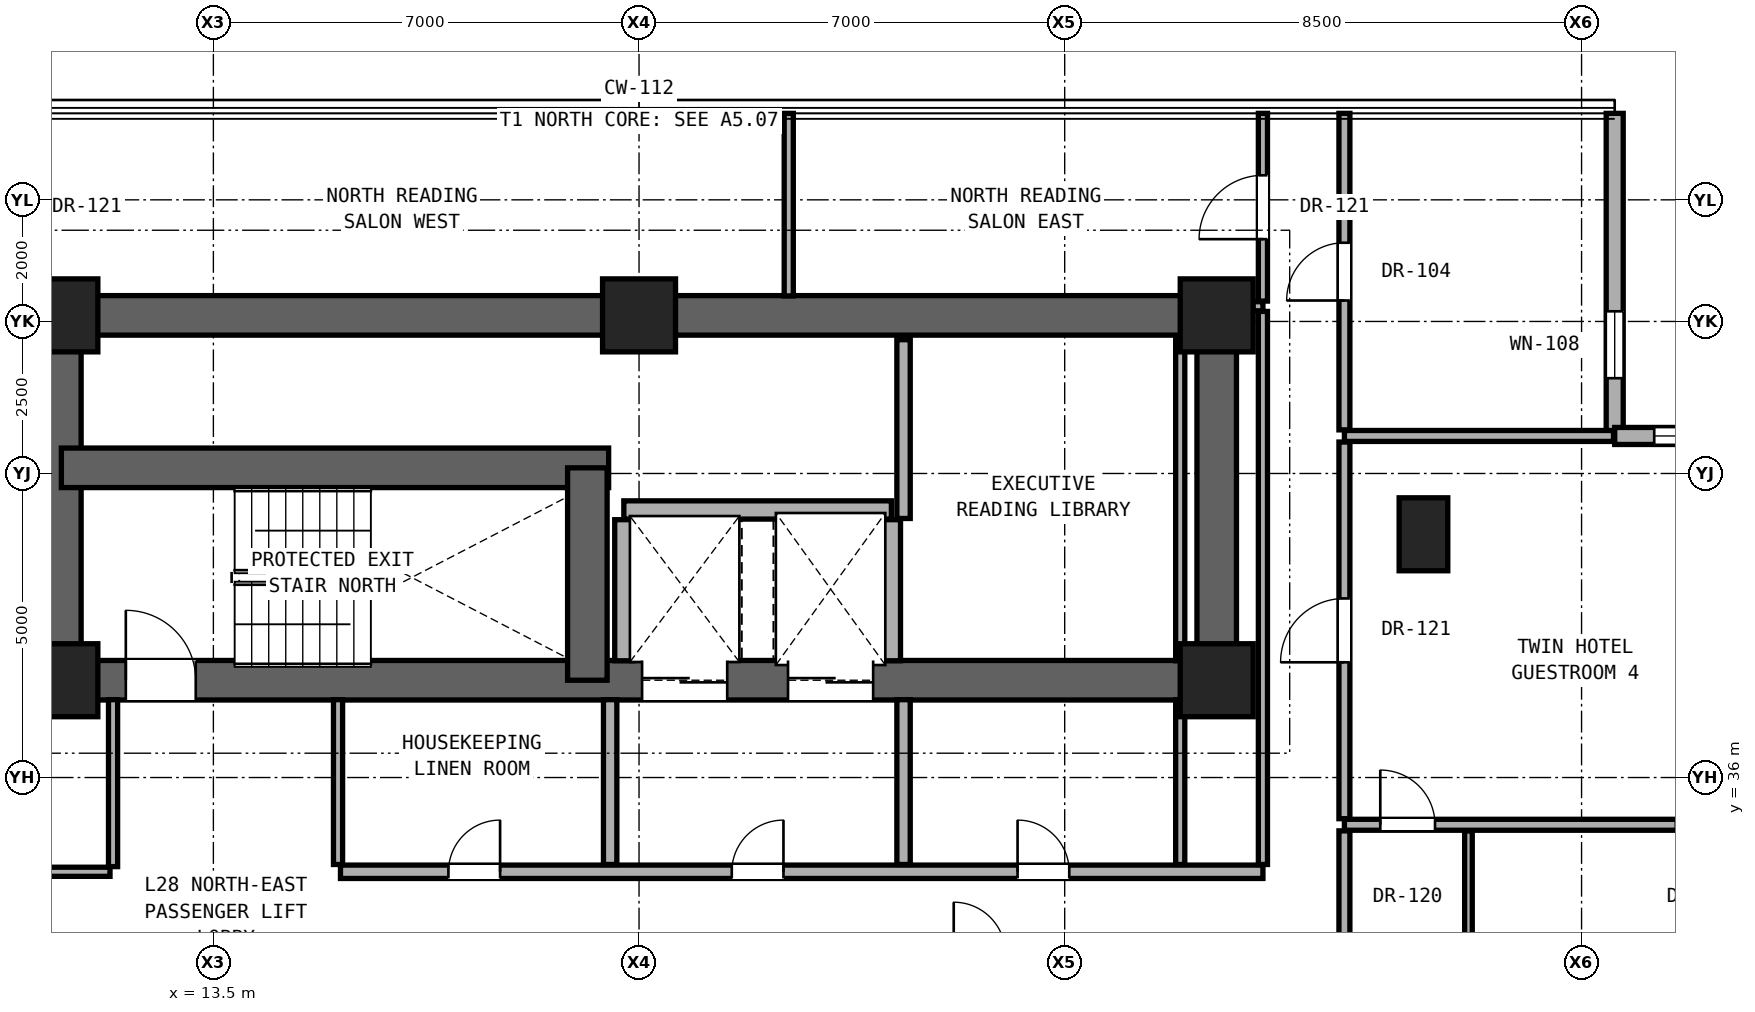
"""IFC4 building model, lengths in metres.
Left out: names, types, materials, properties, quantities, classifications, styles, units other than length and angle.
Written with IfcOpenShell. Run it as: python <this file> out.ifc"""

import sys

from ifc_helpers import new_model, si_unit, direction, frame, frame_2d, origin, origin_2d, place, context, subcontext, project, spatial, rectangle, extrude, element, fill, save


model = new_model("IFC4")
c1 = context("Model", 3, precision=1e-05, world=origin(), true_north=direction((0.0, 1.0)))
c2 = subcontext(c1, "Body", "Model", "MODEL_VIEW")
j1 = project(units=[si_unit("LENGTHUNIT", "METRE"), si_unit("PLANEANGLEUNIT", "RADIAN")], contexts=[c1])
p1 = place(None, origin())
s1 = spatial("IfcSite", under=j1, at=p1, CompositionType="ELEMENT")
p2 = place(p1, origin())
s2 = spatial("IfcBuilding", under=s1, at=p2, CompositionType="ELEMENT")
p3 = place(p2, frame((0.0, 0.0, 101.6)))
s3 = spatial("IfcBuildingStorey", under=s2, at=p3, CompositionType="ELEMENT", Elevation=101.6)
for number, where, z_axis, x_axis in (
    (1, (11.0, 37.6, 0.0), (0.0, 0.0, 1.0), (1.0, 0.0, 0.0)),
    (2, (30.0, 37.6, 0.0), (0.0, 0.0, 1.0), (1.0, 0.0, 0.0)),
    (3, (11.0, 43.6, 0.0), (0.0, 0.0, 1.0), (1.0, 0.0, 0.0)),
    (4, (20.5, 43.6, 0.0), (0.0, 0.0, 1.0), (1.0, 0.0, 0.0)),
    (5, (30.0, 43.6, 0.0), (0.0, 0.0, 1.0), (1.0, 0.0, 0.0)),
):
    element("IfcColumn", number, at=place(p3, frame(where, z_axis=z_axis, x_axis=x_axis)), inside=s3, PredefinedType="COLUMN", context=c2, shape_type="SweptSolid", body=[
        extrude(rectangle(XDim=1.2, YDim=1.2, at=origin_2d()), origin(), (0.0, 0.0, 1.0), 3.3),
    ])
p4 = place(p3, frame((33.4, 40.0, 0.0), z_axis=(0.0, 0.0, 1.0), x_axis=(1.0, 0.0, 0.0)))
e6 = element("IfcColumn", 6, at=p4, inside=s3, PredefinedType="PILASTER", context=c2, shape_type="SweptSolid", body=[
    extrude(rectangle(XDim=0.8, YDim=1.2, at=origin_2d()), origin(), (0.0, 0.0, 1.0), 3.3),
])
p5 = place(p3, frame((11.0, 43.6, 0.0), z_axis=(0.0, 0.0, 1.0), x_axis=(1.0, 0.0, 0.0)))
e7 = element("IfcWall", 7, at=p5, inside=s3, PredefinedType="SHEAR", context=c2, shape_type="SweptSolid", body=[
    extrude(rectangle(XDim=19.0, YDim=0.65, at=frame_2d((9.5, 0.0))), origin(), (0.0, 0.0, 1.0), 3.08),
])
for number, where, z_axis, x_axis in (
    (8, (11.0, 37.6, 0.0), (0.0, 0.0, 1.0), (0.0, 1.0, 0.0)),
    (9, (30.0, 37.6, 0.0), (0.0, 0.0, 1.0), (0.0, 1.0, 0.0)),
):
    element("IfcWall", number, at=place(p3, frame(where, z_axis=z_axis, x_axis=x_axis)), inside=s3, PredefinedType="SHEAR", context=c2, shape_type="SweptSolid", body=[
        extrude(rectangle(XDim=6.0, YDim=0.65, at=frame_2d((3.0, 0.0))), origin(), (0.0, 0.0, 1.0), 3.08),
    ])
p6 = place(p3, frame((11.0, 37.6, 0.0), z_axis=(0.0, 0.0, 1.0), x_axis=(1.0, 0.0, 0.0)))
e10 = element("IfcWall", 10, at=p6, inside=s3, PredefinedType="SHEAR", context=c2, shape_type="SweptSolid", body=[
    extrude(rectangle(XDim=19.0, YDim=0.65, at=frame_2d((9.5, 0.0))), origin(), (0.0, 0.0, 1.0), 3.08),
])
p7 = place(p6, frame((1.06, 0.0, 0.0)))
e11 = element("IfcOpeningElement", 11, at=p7, cuts=e10, PredefinedType="OPENING", context=c2, shape_type="SweptSolid", body=[
    extrude(rectangle(XDim=1.15, YDim=2.2, at=frame_2d((0.575, 1.1))), frame((0.0, 0.335, 0.0), z_axis=(0.0, -1.0, 0.0), x_axis=(1.0, 0.0, 0.0)), (0.0, 0.0, 1.0), 0.67),
])
p8 = place(p6, frame((9.55, 0.0, 0.0)))
e12 = element("IfcOpeningElement", 12, at=p8, cuts=e10, PredefinedType="OPENING", context=c2, shape_type="SweptSolid", body=[
    extrude(rectangle(XDim=1.4, YDim=2.35, at=frame_2d((0.7, 1.175))), frame((0.0, 0.335, 0.0), z_axis=(0.0, -1.0, 0.0), x_axis=(1.0, 0.0, 0.0)), (0.0, 0.0, 1.0), 0.67),
])
p9 = place(p6, frame((11.95, 0.0, 0.0)))
e13 = element("IfcOpeningElement", 13, at=p9, cuts=e10, PredefinedType="OPENING", context=c2, shape_type="SweptSolid", body=[
    extrude(rectangle(XDim=1.4, YDim=2.35, at=frame_2d((0.7, 1.175))), frame((0.0, 0.335, 0.0), z_axis=(0.0, -1.0, 0.0), x_axis=(1.0, 0.0, 0.0)), (0.0, 0.0, 1.0), 0.67),
])
p10 = place(p3, frame((11.0, 41.093, 0.0), z_axis=(0.0, 0.0, 1.0), x_axis=(1.0, 0.0, 0.0)))
e14 = element("IfcWall", 14, at=p10, inside=s3, PredefinedType="SHEAR", context=c2, shape_type="SweptSolid", body=[
    extrude(rectangle(XDim=9.0, YDim=0.65, at=frame_2d((4.5, 0.0))), origin(), (0.0, 0.0, 1.0), 3.08),
])
p11 = place(p3, frame((19.65, 37.6, 0.0), z_axis=(0.0, 0.0, 1.0), x_axis=(0.0, 1.0, 0.0)))
e15 = element("IfcWall", 15, at=p11, inside=s3, PredefinedType="SHEAR", context=c2, shape_type="SweptSolid", body=[
    extrude(rectangle(XDim=3.493, YDim=0.65, at=frame_2d((1.747, 0.0))), origin(), (0.0, 0.0, 1.0), 3.08),
])
p12 = place(p3, frame((36.545, 41.617, 0.0), z_axis=(0.0, 0.0, 1.0), x_axis=(0.0, 1.0, 0.0)))
e16 = element("IfcWall", 16, at=p12, inside=s3, PredefinedType="SOLIDWALL", context=c2, shape_type="SweptSolid", body=[
    extrude(rectangle(XDim=5.305, YDim=0.28, at=frame_2d((2.653, 0.0))), origin(), (0.0, 0.0, 1.0), 3.06),
])
p13 = place(p12, frame((0.95, 0.0, 0.85)))
e17 = element("IfcOpeningElement", 17, at=p13, cuts=e16, PredefinedType="OPENING", context=c2, shape_type="SweptSolid", body=[
    extrude(rectangle(XDim=1.1, YDim=2.0, at=frame_2d((0.55, 1.0))), frame((0.0, 0.15, 0.0), z_axis=(0.0, -1.0, 0.0), x_axis=(1.0, 0.0, 0.0)), (0.0, 0.0, 1.0), 0.3),
])
p14 = place(p3, frame((41.85, 41.617, 0.0), z_axis=(0.0, 0.0, 1.0), x_axis=(-1.0, 0.0, 0.0)))
e18 = element("IfcWall", 18, at=p14, inside=s3, PredefinedType="SOLIDWALL", context=c2, shape_type="SweptSolid", body=[
    extrude(rectangle(XDim=5.305, YDim=0.28, at=frame_2d((2.653, 0.0))), origin(), (0.0, 0.0, 1.0), 3.06),
])
p15 = place(p14, frame((3.555, 0.0, 0.85)))
e19 = element("IfcOpeningElement", 19, at=p15, cuts=e18, PredefinedType="OPENING", context=c2, shape_type="SweptSolid", body=[
    extrude(rectangle(XDim=1.1, YDim=2.0, at=frame_2d((0.55, 1.0))), frame((0.0, 0.15, 0.0), z_axis=(0.0, -1.0, 0.0), x_axis=(1.0, 0.0, 0.0)), (0.0, 0.0, 1.0), 0.3),
])
p16 = place(p3, frame((10.24, 34.45, 0.0), z_axis=(0.0, 0.0, 1.0), x_axis=(1.0, 0.0, 0.0)))
e20 = element("IfcWall", 20, at=p16, inside=s3, PredefinedType="PARTITIONING", context=c2, shape_type="SweptSolid", body=[
    extrude(rectangle(XDim=1.56, YDim=0.15, at=frame_2d((0.78, 0.0))), origin(), (0.0, 0.0, 1.0), 2.124),
])
p17 = place(p3, frame((15.59, 34.45, 0.0), z_axis=(0.0, 0.0, 1.0), x_axis=(1.0, 0.0, 0.0)))
e21 = element("IfcWall", 21, at=p17, inside=s3, PredefinedType="SOLIDWALL", context=c2, shape_type="SweptSolid", body=[
    extrude(rectangle(XDim=15.17, YDim=0.22, at=frame_2d((7.585, 0.0))), origin(), (0.0, 0.0, 1.0), 2.124),
])
p18 = place(p17, frame((6.435, 0.0, 0.0)))
e22 = element("IfcOpeningElement", 22, at=p18, cuts=e21, PredefinedType="OPENING", context=c2, shape_type="SweptSolid", body=[
    extrude(rectangle(XDim=0.85, YDim=2.01, at=frame_2d((0.425, 1.005))), frame((0.0, 0.12, 0.0), z_axis=(0.0, -1.0, 0.0), x_axis=(1.0, 0.0, 0.0)), (0.0, 0.0, 1.0), 0.24),
])
p19 = place(p17, frame((11.135, 0.0, 0.0)))
e23 = element("IfcOpeningElement", 23, at=p19, cuts=e21, PredefinedType="OPENING", context=c2, shape_type="SweptSolid", body=[
    extrude(rectangle(XDim=0.85, YDim=2.01, at=frame_2d((0.425, 1.005))), frame((0.0, 0.12, 0.0), z_axis=(0.0, -1.0, 0.0), x_axis=(1.0, 0.0, 0.0)), (0.0, 0.0, 1.0), 0.24),
])
p20 = place(p17, frame((1.775, 0.0, 0.0)))
e24 = element("IfcOpeningElement", 24, at=p20, cuts=e21, PredefinedType="OPENING", context=c2, shape_type="SweptSolid", body=[
    extrude(rectangle(XDim=0.85, YDim=2.01, at=frame_2d((0.425, 1.005))), frame((0.0, 0.12, 0.0), z_axis=(0.0, -1.0, 0.0), x_axis=(1.0, 0.0, 0.0)), (0.0, 0.0, 1.0), 0.24),
])
p21 = place(p3, frame((32.1, 35.223, 0.0), z_axis=(0.0, 0.0, 1.0), x_axis=(1.0, 0.0, 0.0)))
e25 = element("IfcWall", 25, at=p21, inside=s3, PredefinedType="PARTITIONING", context=c2, shape_type="SweptSolid", body=[
    extrude(rectangle(XDim=9.75, YDim=0.18, at=frame_2d((4.875, 0.0))), origin(), (0.0, 0.0, 1.0), 2.145),
])
p22 = place(p21, frame((5.45, 0.0, 0.0)))
e26 = element("IfcOpeningElement", 26, at=p22, cuts=e25, PredefinedType="OPENING", context=c2, shape_type="SweptSolid", body=[
    extrude(rectangle(XDim=0.85, YDim=2.01, at=frame_2d((0.425, 1.005))), frame((0.0, 0.1, 0.0), z_axis=(0.0, -1.0, 0.0), x_axis=(1.0, 0.0, 0.0)), (0.0, 0.0, 1.0), 0.2),
])
p23 = place(p21, frame((0.59, 0.0, 0.0)))
e27 = element("IfcOpeningElement", 27, at=p23, cuts=e25, PredefinedType="OPENING", context=c2, shape_type="SweptSolid", body=[
    extrude(rectangle(XDim=0.9, YDim=2.1, at=frame_2d((0.45, 1.05))), frame((0.0, 0.1, 0.0), z_axis=(0.0, -1.0, 0.0), x_axis=(1.0, 0.0, 0.0)), (0.0, 0.0, 1.0), 0.2),
])
p24 = place(p3, frame((20.25, 40.4, 0.0), z_axis=(0.0, 0.0, 1.0), x_axis=(1.0, 0.0, 0.0)))
e28 = element("IfcWall", 28, at=p24, inside=s3, PredefinedType="SOLIDWALL", context=c2, shape_type="SweptSolid", body=[
    extrude(rectangle(XDim=4.4, YDim=0.3, at=frame_2d((2.2, 0.0))), origin(), (0.0, 0.0, 1.0), 3.08),
])
p25 = place(p3, frame((32.1, 41.617, 0.0), z_axis=(0.0, 0.0, 1.0), x_axis=(1.0, 0.0, 0.0)))
e29 = element("IfcWall", 29, at=p25, inside=s3, PredefinedType="PARTITIONING", context=c2, shape_type="SweptSolid", body=[
    extrude(rectangle(XDim=4.425, YDim=0.18, at=frame_2d((2.212, 0.0))), origin(), (0.0, 0.0, 1.0), 3.08),
])
p26 = place(p3, frame((30.32, 43.75, 0.0), z_axis=(0.0, 0.0, 1.0), x_axis=(1.0, 0.0, 0.0)))
e30 = element("IfcWall", 30, at=p26, inside=s3, PredefinedType="PARTITIONING", context=c2, shape_type="SweptSolid", body=[
    extrude(rectangle(XDim=0.44, YDim=0.15, at=frame_2d((0.22, 0.0))), origin(), (0.0, 0.0, 1.0), 3.08),
])
p27 = place(p3, frame((11.85, 34.535, 0.0), z_axis=(0.0, 0.0, 1.0), x_axis=(0.0, 1.0, 0.0)))
e31 = element("IfcWall", 31, at=p27, inside=s3, PredefinedType="PARTITIONING", context=c2, shape_type="SweptSolid", body=[
    extrude(rectangle(XDim=2.745, YDim=0.15, at=frame_2d((1.373, 0.0))), origin(), (0.0, 0.0, 1.0), 3.08),
])
p28 = place(p3, frame((15.55, 34.57, 0.0), z_axis=(0.0, 0.0, 1.0), x_axis=(0.0, 1.0, 0.0)))
e32 = element("IfcWall", 32, at=p28, inside=s3, PredefinedType="PARTITIONING", context=c2, shape_type="SweptSolid", body=[
    extrude(rectangle(XDim=2.71, YDim=0.15, at=frame_2d((1.355, 0.0))), origin(), (0.0, 0.0, 1.0), 2.609),
])
p29 = place(p3, frame((20.025, 34.57, 0.0), z_axis=(0.0, 0.0, 1.0), x_axis=(0.0, 1.0, 0.0)))
e33 = element("IfcWall", 33, at=p29, inside=s3, PredefinedType="SOLIDWALL", context=c2, shape_type="SweptSolid", body=[
    extrude(rectangle(XDim=2.71, YDim=0.22, at=frame_2d((1.355, 0.0))), origin(), (0.0, 0.0, 1.0), 3.08),
])
p30 = place(p3, frame((20.25, 37.92, 0.0), z_axis=(0.0, 0.0, 1.0), x_axis=(0.0, 1.0, 0.0)))
e34 = element("IfcWall", 34, at=p30, inside=s3, PredefinedType="SOLIDWALL", context=c2, shape_type="SweptSolid", body=[
    extrude(rectangle(XDim=2.32, YDim=0.3, at=frame_2d((1.16, 0.0))), origin(), (0.0, 0.0, 1.0), 3.08),
])
p31 = place(p3, frame((22.962, 43.92, 0.0), z_axis=(0.0, 0.0, 1.0), x_axis=(0.0, 1.0, 0.0)))
e35 = element("IfcWall", 35, at=p31, inside=s3, PredefinedType="PARTITIONING", context=c2, shape_type="SweptSolid", body=[
    extrude(rectangle(XDim=3.002, YDim=0.15, at=frame_2d((1.501, 0.0))), origin(), (0.0, 0.0, 1.0), 3.08),
])
p32 = place(p3, frame((24.65, 37.92, 0.0), z_axis=(0.0, 0.0, 1.0), x_axis=(0.0, 1.0, 0.0)))
e36 = element("IfcWall", 36, at=p32, inside=s3, PredefinedType="SOLIDWALL", context=c2, shape_type="SweptSolid", body=[
    extrude(rectangle(XDim=2.32, YDim=0.3, at=frame_2d((1.16, 0.0))), origin(), (0.0, 0.0, 1.0), 3.08),
])
p33 = place(p3, frame((24.85, 34.57, 0.0), z_axis=(0.0, 0.0, 1.0), x_axis=(0.0, 1.0, 0.0)))
e37 = element("IfcWall", 37, at=p33, inside=s3, PredefinedType="SOLIDWALL", context=c2, shape_type="SweptSolid", body=[
    extrude(rectangle(XDim=2.71, YDim=0.22, at=frame_2d((1.355, 0.0))), origin(), (0.0, 0.0, 1.0), 3.08),
])
p34 = place(p3, frame((24.85, 40.26, 0.0), z_axis=(0.0, 0.0, 1.0), x_axis=(0.0, 1.0, 0.0)))
e38 = element("IfcWall", 38, at=p34, inside=s3, PredefinedType="SOLIDWALL", context=c2, shape_type="SweptSolid", body=[
    extrude(rectangle(XDim=2.94, YDim=0.22, at=frame_2d((1.47, 0.0))), origin(), (0.0, 0.0, 1.0), 3.08),
])
p35 = place(p3, frame((29.4, 34.57, 0.0), z_axis=(0.0, 0.0, 1.0), x_axis=(0.0, 1.0, 0.0)))
e39 = element("IfcWall", 39, at=p35, inside=s3, PredefinedType="PARTITIONING", context=c2, shape_type="SweptSolid", body=[
    extrude(rectangle(XDim=2.71, YDim=0.15, at=frame_2d((1.355, 0.0))), origin(), (0.0, 0.0, 1.0), 3.08),
])
p36 = place(p3, frame((29.4, 37.92, 0.0), z_axis=(0.0, 0.0, 1.0), x_axis=(0.0, 1.0, 0.0)))
e40 = element("IfcWall", 40, at=p36, inside=s3, PredefinedType="PARTITIONING", context=c2, shape_type="SweptSolid", body=[
    extrude(rectangle(XDim=5.28, YDim=0.15, at=frame_2d((2.64, 0.0))), origin(), (0.0, 0.0, 1.0), 3.08),
])
p37 = place(p3, frame((30.76, 34.57, 0.0), z_axis=(0.0, 0.0, 1.0), x_axis=(0.0, 1.0, 0.0)))
e41 = element("IfcWall", 41, at=p37, inside=s3, PredefinedType="PARTITIONING", context=c2, shape_type="SweptSolid", body=[
    extrude(rectangle(XDim=9.095, YDim=0.15, at=frame_2d((4.547, 0.0))), origin(), (0.0, 0.0, 1.0), 2.456),
])
p38 = place(p3, frame((30.76, 43.835, 0.0), z_axis=(0.0, 0.0, 1.0), x_axis=(0.0, 1.0, 0.0)))
e42 = element("IfcWall", 42, at=p38, inside=s3, PredefinedType="PARTITIONING", context=c2, shape_type="SweptSolid", body=[
    extrude(rectangle(XDim=3.087, YDim=0.15, at=frame_2d((1.543, 0.0))), origin(), (0.0, 0.0, 1.0), 3.08),
])
p39 = place(p38, frame((1.019, 0.0, 0.0)))
e43 = element("IfcOpeningElement", 43, at=p39, cuts=e42, PredefinedType="OPENING", context=c2, shape_type="SweptSolid", body=[
    extrude(rectangle(XDim=1.05, YDim=2.2, at=frame_2d((0.525, 1.1))), frame((0.0, 0.085, 0.0), z_axis=(0.0, -1.0, 0.0), x_axis=(1.0, 0.0, 0.0)), (0.0, 0.0, 1.0), 0.17),
])
p40 = place(p3, frame((32.1, 33.023, 0.0), z_axis=(0.0, 0.0, 1.0), x_axis=(0.0, 1.0, 0.0)))
e44 = element("IfcWall", 44, at=p40, inside=s3, PredefinedType="PARTITIONING", context=c2, shape_type="SweptSolid", body=[
    extrude(rectangle(XDim=2.1, YDim=0.18, at=frame_2d((1.05, 0.0))), origin(), (0.0, 0.0, 1.0), 3.08),
])
p41 = place(p3, frame((32.1, 35.323, 0.0), z_axis=(0.0, 0.0, 1.0), x_axis=(0.0, 1.0, 0.0)))
e45 = element("IfcWall", 45, at=p41, inside=s3, PredefinedType="PARTITIONING", context=c2, shape_type="SweptSolid", body=[
    extrude(rectangle(XDim=6.194, YDim=0.18, at=frame_2d((3.097, 0.0))), origin(), (0.0, 0.0, 1.0), 2.456),
])
p42 = place(p41, frame((2.572, 0.0, 0.0)))
e46 = element("IfcOpeningElement", 46, at=p42, cuts=e45, PredefinedType="OPENING", context=c2, shape_type="SweptSolid", body=[
    extrude(rectangle(XDim=1.05, YDim=2.2, at=frame_2d((0.525, 1.1))), frame((0.0, 0.1, 0.0), z_axis=(0.0, -1.0, 0.0), x_axis=(1.0, 0.0, 0.0)), (0.0, 0.0, 1.0), 0.2),
])
p43 = place(p3, frame((32.1, 41.717, 0.0), z_axis=(0.0, 0.0, 1.0), x_axis=(0.0, 1.0, 0.0)))
e47 = element("IfcWall", 47, at=p43, inside=s3, PredefinedType="PARTITIONING", context=c2, shape_type="SweptSolid", body=[
    extrude(rectangle(XDim=5.205, YDim=0.18, at=frame_2d((2.603, 0.0))), origin(), (0.0, 0.0, 1.0), 3.08),
])
p44 = place(p43, frame((2.127, 0.0, 0.0)))
e48 = element("IfcOpeningElement", 48, at=p44, cuts=e47, PredefinedType="OPENING", context=c2, shape_type="SweptSolid", body=[
    extrude(rectangle(XDim=0.95, YDim=2.15, at=frame_2d((0.475, 1.075))), frame((0.0, 0.1, 0.0), z_axis=(0.0, -1.0, 0.0), x_axis=(1.0, 0.0, 0.0)), (0.0, 0.0, 1.0), 0.2),
])
p45 = place(p3, frame((34.14, 33.023, 0.0), z_axis=(0.0, 0.0, 1.0), x_axis=(0.0, 1.0, 0.0)))
e49 = element("IfcWall", 49, at=p45, inside=s3, PredefinedType="PARTITIONING", context=c2, shape_type="SweptSolid", body=[
    extrude(rectangle(XDim=2.1, YDim=0.125, at=frame_2d((1.05, 0.0))), origin(), (0.0, 0.0, 1.0), 3.08),
])
p46 = place(p13, origin())
e50 = element("IfcWindow", 50, at=p46, inside=s3, PartitioningType="SINGLE_PANEL", PredefinedType="WINDOW", context=c2, shape_type="SweptSolid", body=[
    extrude(rectangle(XDim=1.1, YDim=2.0, at=frame_2d((0.55, 1.0))), frame((0.0, 0.03, 0.0), z_axis=(0.0, -1.0, 0.0), x_axis=(1.0, 0.0, 0.0)), (0.0, 0.0, 1.0), 0.06),
])
fill(e17, e50)
p47 = place(p15, origin())
e51 = element("IfcWindow", 51, at=p47, inside=s3, PartitioningType="SINGLE_PANEL", PredefinedType="WINDOW", context=c2, shape_type="SweptSolid", body=[
    extrude(rectangle(XDim=1.1, YDim=2.0, at=frame_2d((0.55, 1.0))), frame((0.0, 0.03, 0.0), z_axis=(0.0, -1.0, 0.0), x_axis=(1.0, 0.0, 0.0)), (0.0, 0.0, 1.0), 0.06),
])
fill(e19, e51)
p48 = place(p7, origin())
e52 = element("IfcDoor", 52, at=p48, inside=s3, OperationType="SINGLE_SWING_LEFT", PredefinedType="DOOR", context=c2, shape_type="SweptSolid", body=[
    extrude(rectangle(XDim=1.15, YDim=2.2, at=frame_2d((0.575, 1.1))), frame((0.0, 0.025, 0.0), z_axis=(0.0, -1.0, 0.0), x_axis=(1.0, 0.0, 0.0)), (0.0, 0.0, 1.0), 0.05),
])
fill(e11, e52)
p49 = place(p18, origin())
e53 = element("IfcDoor", 53, at=p49, inside=s3, OperationType="SINGLE_SWING_RIGHT", PredefinedType="DOOR", context=c2, shape_type="SweptSolid", body=[
    extrude(rectangle(XDim=0.85, YDim=2.01, at=frame_2d((0.425, 1.005))), frame((0.0, 0.025, 0.0), z_axis=(0.0, -1.0, 0.0), x_axis=(1.0, 0.0, 0.0)), (0.0, 0.0, 1.0), 0.05),
])
fill(e22, e53)
p50 = place(p19, origin())
e54 = element("IfcDoor", 54, at=p50, inside=s3, OperationType="SINGLE_SWING_LEFT", PredefinedType="DOOR", context=c2, shape_type="SweptSolid", body=[
    extrude(rectangle(XDim=0.85, YDim=2.01, at=frame_2d((0.425, 1.005))), frame((0.0, 0.025, 0.0), z_axis=(0.0, -1.0, 0.0), x_axis=(1.0, 0.0, 0.0)), (0.0, 0.0, 1.0), 0.05),
])
fill(e23, e54)
p51 = place(p20, origin())
e55 = element("IfcDoor", 55, at=p51, inside=s3, OperationType="SINGLE_SWING_RIGHT", PredefinedType="DOOR", context=c2, shape_type="SweptSolid", body=[
    extrude(rectangle(XDim=0.85, YDim=2.01, at=frame_2d((0.425, 1.005))), frame((0.0, 0.025, 0.0), z_axis=(0.0, -1.0, 0.0), x_axis=(1.0, 0.0, 0.0)), (0.0, 0.0, 1.0), 0.05),
])
fill(e24, e55)
p52 = place(p42, origin())
e56 = element("IfcDoor", 56, at=p52, inside=s3, OperationType="SINGLE_SWING_LEFT", PredefinedType="DOOR", context=c2, shape_type="SweptSolid", body=[
    extrude(rectangle(XDim=1.05, YDim=2.2, at=frame_2d((0.525, 1.1))), frame((0.0, 0.025, 0.0), z_axis=(0.0, -1.0, 0.0), x_axis=(1.0, 0.0, 0.0)), (0.0, 0.0, 1.0), 0.05),
])
fill(e46, e56)
p53 = place(p23, origin())
e57 = element("IfcDoor", 57, at=p53, inside=s3, OperationType="SINGLE_SWING_LEFT", PredefinedType="DOOR", context=c2, shape_type="SweptSolid", body=[
    extrude(rectangle(XDim=0.9, YDim=2.1, at=frame_2d((0.45, 1.05))), frame((0.0, 0.025, 0.0), z_axis=(0.0, -1.0, 0.0), x_axis=(1.0, 0.0, 0.0)), (0.0, 0.0, 1.0), 0.05),
])
fill(e27, e57)
p54 = place(p39, origin())
e58 = element("IfcDoor", 58, at=p54, inside=s3, OperationType="SINGLE_SWING_LEFT", PredefinedType="DOOR", context=c2, shape_type="SweptSolid", body=[
    extrude(rectangle(XDim=1.05, YDim=2.2, at=frame_2d((0.525, 1.1))), frame((0.0, 0.025, 0.0), z_axis=(0.0, -1.0, 0.0), x_axis=(1.0, 0.0, 0.0)), (0.0, 0.0, 1.0), 0.05),
])
fill(e43, e58)
p55 = place(p44, origin())
e59 = element("IfcDoor", 59, at=p55, inside=s3, OperationType="SINGLE_SWING_LEFT", PredefinedType="DOOR", context=c2, shape_type="SweptSolid", body=[
    extrude(rectangle(XDim=0.95, YDim=2.15, at=frame_2d((0.475, 1.075))), frame((0.0, 0.025, 0.0), z_axis=(0.0, -1.0, 0.0), x_axis=(1.0, 0.0, 0.0)), (0.0, 0.0, 1.0), 0.05),
])
fill(e48, e59)
p56 = place(p8, origin())
e60 = element("IfcDoor", 60, at=p56, inside=s3, OperationType="DOUBLE_DOOR_SLIDING", PredefinedType="DOOR", context=c2, shape_type="SweptSolid", body=[
    extrude(rectangle(XDim=1.4, YDim=2.35, at=frame_2d((0.7, 1.175))), frame((0.0, 0.025, 0.0), z_axis=(0.0, -1.0, 0.0), x_axis=(1.0, 0.0, 0.0)), (0.0, 0.0, 1.0), 0.05),
])
fill(e12, e60)
p57 = place(p9, origin())
e61 = element("IfcDoor", 61, at=p57, inside=s3, OperationType="DOUBLE_DOOR_SLIDING", PredefinedType="DOOR", context=c2, shape_type="SweptSolid", body=[
    extrude(rectangle(XDim=1.4, YDim=2.35, at=frame_2d((0.7, 1.175))), frame((0.0, 0.025, 0.0), z_axis=(0.0, -1.0, 0.0), x_axis=(1.0, 0.0, 0.0)), (0.0, 0.0, 1.0), 0.05),
])
fill(e13, e61)
save(model, sys.argv[1])
